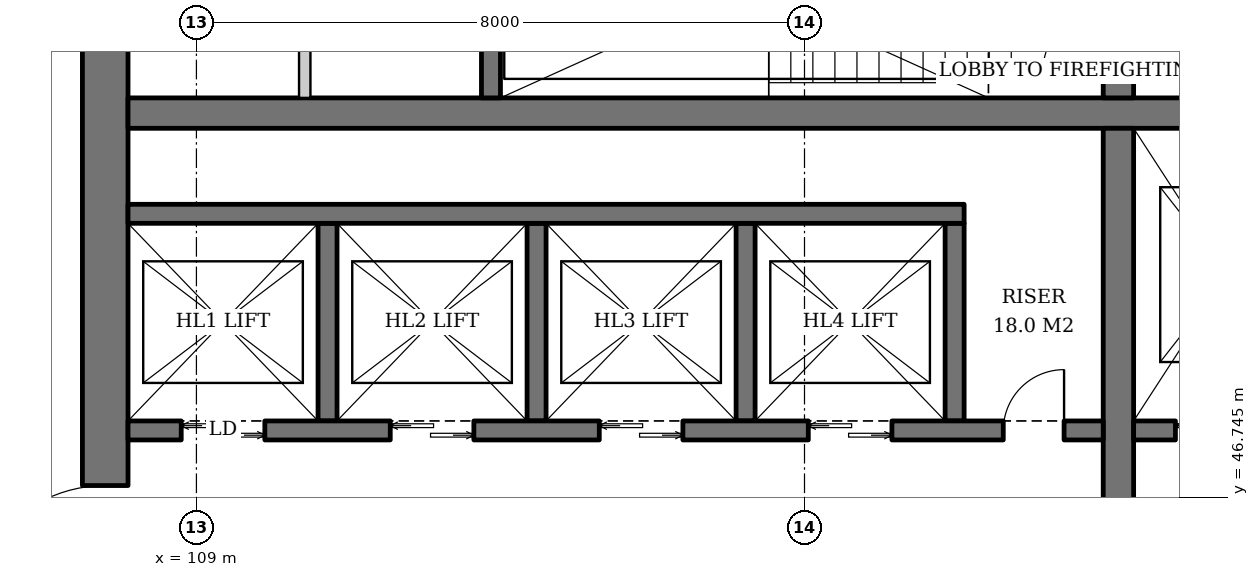
"""IFC4 building model, lengths in metres.
Left out: names, types, materials, properties, quantities, classifications, styles, units other than length and angle.
Written with IfcOpenShell. Run it as: python <this file> out.ifc"""

import sys

from ifc_helpers import new_model, si_unit, direction, frame, frame_2d, origin, place, context, subcontext, project, spatial, rectangle, extrude, element, fill, save


model = new_model("IFC4")
c1 = context("Model", 3, precision=1e-05, world=origin(), true_north=direction((0.0, 1.0)))
c2 = subcontext(c1, "Body", "Model", "MODEL_VIEW")
j1 = project(units=[si_unit("LENGTHUNIT", "METRE"), si_unit("PLANEANGLEUNIT", "RADIAN")], contexts=[c1])
p1 = place(None, origin())
s1 = spatial("IfcSite", under=j1, at=p1, CompositionType="ELEMENT")
p2 = place(p1, origin())
s2 = spatial("IfcBuilding", under=s1, at=p2, CompositionType="ELEMENT")
p3 = place(p2, frame((0.0, 0.0, 47.6)))
s3 = spatial("IfcBuildingStorey", under=s2, at=p3, CompositionType="ELEMENT", Elevation=47.6)
p4 = place(p3, frame((107.8, 37.1, 0.0), z_axis=(0.0, 0.0, 1.0), x_axis=(0.0, 1.0, 0.0)))
e1 = element("IfcWall", 1, at=p4, inside=s3, PredefinedType="SHEAR", context=c2, shape_type="SweptSolid", body=[
    extrude(rectangle(XDim=17.8, YDim=0.6, at=frame_2d((8.9, 0.0))), origin(), (0.0, 0.0, 1.0), 3.8),
])
p5 = place(p4, frame((8.0, 0.0, 0.0)))
e2 = element("IfcOpeningElement", 2, at=p5, cuts=e1, PredefinedType="OPENING", context=c2, shape_type="SweptSolid", body=[
    extrude(rectangle(XDim=1.8, YDim=2.4, at=frame_2d((0.9, 1.2))), frame((0.0, 0.31, 0.0), z_axis=(0.0, -1.0, 0.0), x_axis=(1.0, 0.0, 0.0)), (0.0, 0.0, 1.0), 0.62),
])
p6 = place(p3, frame((108.1, 51.8, 0.0), z_axis=(0.0, 0.0, 1.0), x_axis=(1.0, 0.0, 0.0)))
e3 = element("IfcWall", 3, at=p6, inside=s3, PredefinedType="SHEAR", context=c2, shape_type="SweptSolid", body=[
    extrude(rectangle(XDim=17.8, YDim=0.4, at=frame_2d((8.9, 0.0))), origin(), (0.0, 0.0, 1.0), 3.8),
])
p7 = place(p3, frame((121.13, 40.4, 0.0), z_axis=(0.0, 0.0, 1.0), x_axis=(0.0, 1.0, 0.0)))
e4 = element("IfcWall", 4, at=p7, inside=s3, PredefinedType="SHEAR", context=c2, shape_type="SweptSolid", body=[
    extrude(rectangle(XDim=11.2, YDim=0.4, at=frame_2d((5.6, 0.0))), origin(), (0.0, 0.0, 1.0), 3.8),
])
p8 = place(p3, frame((121.13, 52.0, 0.0), z_axis=(0.0, 0.0, 1.0), x_axis=(0.0, 1.0, 0.0)))
e5 = element("IfcWall", 5, at=p8, inside=s3, PredefinedType="SHEAR", context=c2, shape_type="SweptSolid", body=[
    extrude(rectangle(XDim=2.9, YDim=0.4, at=frame_2d((1.45, 0.0))), origin(), (0.0, 0.0, 1.0), 3.8),
])
p9 = place(p8, frame((0.3, 0.0, 0.0)))
e6 = element("IfcOpeningElement", 6, at=p9, cuts=e5, PredefinedType="OPENING", context=c2, shape_type="SweptSolid", body=[
    extrude(rectangle(XDim=1.0, YDim=2.1, at=frame_2d((0.5, 1.05))), frame((0.0, 0.21, 0.0), z_axis=(0.0, -1.0, 0.0), x_axis=(1.0, 0.0, 0.0)), (0.0, 0.0, 1.0), 0.42),
])
p10 = place(p3, frame((112.875, 52.0, 0.0), z_axis=(0.0, 0.0, 1.0), x_axis=(0.0, 1.0, 0.0)))
e7 = element("IfcWall", 7, at=p10, inside=s3, PredefinedType="SHEAR", context=c2, shape_type="SweptSolid", body=[
    extrude(rectangle(XDim=2.9, YDim=0.25, at=frame_2d((1.45, 0.0))), origin(), (0.0, 0.0, 1.0), 3.8),
])
for number, where, z_axis, x_axis in (
    (8, (110.725, 47.75, 0.0), (0.0, 0.0, 1.0), (0.0, 1.0, 0.0)),
    (9, (113.475, 47.75, 0.0), (0.0, 0.0, 1.0), (0.0, 1.0, 0.0)),
    (10, (116.225, 47.75, 0.0), (0.0, 0.0, 1.0), (0.0, 1.0, 0.0)),
    (11, (118.975, 47.75, 0.0), (0.0, 0.0, 1.0), (0.0, 1.0, 0.0)),
):
    element("IfcWall", number, at=place(p3, frame(where, z_axis=z_axis, x_axis=x_axis)), inside=s3, PredefinedType="SHEAR", context=c2, shape_type="SweptSolid", body=[
        extrude(rectangle(XDim=2.6, YDim=0.25, at=frame_2d((1.3, 0.0))), origin(), (0.0, 0.0, 1.0), 3.8),
    ])
p11 = place(p3, frame((108.1, 50.475, 0.0), z_axis=(0.0, 0.0, 1.0), x_axis=(1.0, 0.0, 0.0)))
e12 = element("IfcWall", 12, at=p11, inside=s3, PredefinedType="SHEAR", context=c2, shape_type="SweptSolid", body=[
    extrude(rectangle(XDim=11.0, YDim=0.25, at=frame_2d((5.5, 0.0))), origin(), (0.0, 0.0, 1.0), 3.8),
])
p12 = place(p3, frame((108.1, 47.625, 0.0), z_axis=(0.0, 0.0, 1.0), x_axis=(1.0, 0.0, 0.0)))
e13 = element("IfcWall", 13, at=p12, inside=s3, PredefinedType="SHEAR", context=c2, shape_type="SweptSolid", body=[
    extrude(rectangle(XDim=12.83, YDim=0.25, at=frame_2d((6.415, 0.0))), origin(), (0.0, 0.0, 1.0), 3.8),
])
p13 = place(p12, frame((0.7, 0.0, 0.0)))
e14 = element("IfcOpeningElement", 14, at=p13, cuts=e13, PredefinedType="OPENING", context=c2, shape_type="SweptSolid", body=[
    extrude(rectangle(XDim=1.1, YDim=2.2, at=frame_2d((0.55, 1.1))), frame((0.0, 0.135, 0.0), z_axis=(0.0, -1.0, 0.0), x_axis=(1.0, 0.0, 0.0)), (0.0, 0.0, 1.0), 0.27),
])
p14 = place(p12, frame((3.45, 0.0, 0.0)))
e15 = element("IfcOpeningElement", 15, at=p14, cuts=e13, PredefinedType="OPENING", context=c2, shape_type="SweptSolid", body=[
    extrude(rectangle(XDim=1.1, YDim=2.2, at=frame_2d((0.55, 1.1))), frame((0.0, 0.135, 0.0), z_axis=(0.0, -1.0, 0.0), x_axis=(1.0, 0.0, 0.0)), (0.0, 0.0, 1.0), 0.27),
])
p15 = place(p12, frame((6.2, 0.0, 0.0)))
e16 = element("IfcOpeningElement", 16, at=p15, cuts=e13, PredefinedType="OPENING", context=c2, shape_type="SweptSolid", body=[
    extrude(rectangle(XDim=1.1, YDim=2.2, at=frame_2d((0.55, 1.1))), frame((0.0, 0.135, 0.0), z_axis=(0.0, -1.0, 0.0), x_axis=(1.0, 0.0, 0.0)), (0.0, 0.0, 1.0), 0.27),
])
p16 = place(p12, frame((8.95, 0.0, 0.0)))
e17 = element("IfcOpeningElement", 17, at=p16, cuts=e13, PredefinedType="OPENING", context=c2, shape_type="SweptSolid", body=[
    extrude(rectangle(XDim=1.1, YDim=2.2, at=frame_2d((0.55, 1.1))), frame((0.0, 0.135, 0.0), z_axis=(0.0, -1.0, 0.0), x_axis=(1.0, 0.0, 0.0)), (0.0, 0.0, 1.0), 0.27),
])
p17 = place(p12, frame((11.515, 0.0, 0.0)))
e18 = element("IfcOpeningElement", 18, at=p17, cuts=e13, PredefinedType="OPENING", context=c2, shape_type="SweptSolid", body=[
    extrude(rectangle(XDim=0.8, YDim=2.0, at=frame_2d((0.4, 1.0))), frame((0.0, 0.135, 0.0), z_axis=(0.0, -1.0, 0.0), x_axis=(1.0, 0.0, 0.0)), (0.0, 0.0, 1.0), 0.27),
])
p18 = place(p3, frame((121.33, 47.625, 0.0), z_axis=(0.0, 0.0, 1.0), x_axis=(1.0, 0.0, 0.0)))
e19 = element("IfcWall", 19, at=p18, inside=s3, PredefinedType="SHEAR", context=c2, shape_type="SweptSolid", body=[
    extrude(rectangle(XDim=4.57, YDim=0.25, at=frame_2d((2.285, 0.0))), origin(), (0.0, 0.0, 1.0), 3.8),
])
p19 = place(p18, frame((0.55, 0.0, 0.0)))
e20 = element("IfcOpeningElement", 20, at=p19, cuts=e19, PredefinedType="OPENING", context=c2, shape_type="SweptSolid", body=[
    extrude(rectangle(XDim=1.4, YDim=2.4, at=frame_2d((0.7, 1.2))), frame((0.0, 0.135, 0.0), z_axis=(0.0, -1.0, 0.0), x_axis=(1.0, 0.0, 0.0)), (0.0, 0.0, 1.0), 0.27),
])
p20 = place(p18, frame((3.26, 0.0, 0.0)))
e21 = element("IfcOpeningElement", 21, at=p20, cuts=e19, PredefinedType="OPENING", context=c2, shape_type="SweptSolid", body=[
    extrude(rectangle(XDim=0.8, YDim=2.0, at=frame_2d((0.4, 1.0))), frame((0.0, 0.135, 0.0), z_axis=(0.0, -1.0, 0.0), x_axis=(1.0, 0.0, 0.0)), (0.0, 0.0, 1.0), 0.27),
])
p21 = place(p3, frame((110.425, 52.0, 0.0), z_axis=(0.0, 0.0, 1.0), x_axis=(0.0, 1.0, 0.0)))
e22 = element("IfcWall", 22, at=p21, inside=s3, PredefinedType="SOLIDWALL", context=c2, shape_type="SweptSolid", body=[
    extrude(rectangle(XDim=2.9, YDim=0.15, at=frame_2d((1.45, 0.0))), origin(), (0.0, 0.0, 1.0), 3.6),
])
p22 = place(p13, origin())
e23 = element("IfcDoor", 23, at=p22, inside=s3, OperationType="DOUBLE_DOOR_SLIDING", PredefinedType="DOOR", context=c2, shape_type="SweptSolid", body=[
    extrude(rectangle(XDim=1.1, YDim=2.2, at=frame_2d((0.55, 1.1))), frame((0.0, 0.025, 0.0), z_axis=(0.0, -1.0, 0.0), x_axis=(1.0, 0.0, 0.0)), (0.0, 0.0, 1.0), 0.05),
])
fill(e14, e23)
p23 = place(p14, origin())
e24 = element("IfcDoor", 24, at=p23, inside=s3, OperationType="DOUBLE_DOOR_SLIDING", PredefinedType="DOOR", context=c2, shape_type="SweptSolid", body=[
    extrude(rectangle(XDim=1.1, YDim=2.2, at=frame_2d((0.55, 1.1))), frame((0.0, 0.025, 0.0), z_axis=(0.0, -1.0, 0.0), x_axis=(1.0, 0.0, 0.0)), (0.0, 0.0, 1.0), 0.05),
])
fill(e15, e24)
p24 = place(p15, origin())
e25 = element("IfcDoor", 25, at=p24, inside=s3, OperationType="DOUBLE_DOOR_SLIDING", PredefinedType="DOOR", context=c2, shape_type="SweptSolid", body=[
    extrude(rectangle(XDim=1.1, YDim=2.2, at=frame_2d((0.55, 1.1))), frame((0.0, 0.025, 0.0), z_axis=(0.0, -1.0, 0.0), x_axis=(1.0, 0.0, 0.0)), (0.0, 0.0, 1.0), 0.05),
])
fill(e16, e25)
p25 = place(p16, origin())
e26 = element("IfcDoor", 26, at=p25, inside=s3, OperationType="DOUBLE_DOOR_SLIDING", PredefinedType="DOOR", context=c2, shape_type="SweptSolid", body=[
    extrude(rectangle(XDim=1.1, YDim=2.2, at=frame_2d((0.55, 1.1))), frame((0.0, 0.025, 0.0), z_axis=(0.0, -1.0, 0.0), x_axis=(1.0, 0.0, 0.0)), (0.0, 0.0, 1.0), 0.05),
])
fill(e17, e26)
p26 = place(p17, origin())
e27 = element("IfcDoor", 27, at=p26, inside=s3, OperationType="SINGLE_SWING_RIGHT", PredefinedType="DOOR", context=c2, shape_type="SweptSolid", body=[
    extrude(rectangle(XDim=0.8, YDim=2.0, at=frame_2d((0.4, 1.0))), frame((0.0, 0.025, 0.0), z_axis=(0.0, -1.0, 0.0), x_axis=(1.0, 0.0, 0.0)), (0.0, 0.0, 1.0), 0.05),
])
fill(e18, e27)
p27 = place(p19, origin())
e28 = element("IfcDoor", 28, at=p27, inside=s3, OperationType="DOUBLE_DOOR_SLIDING", PredefinedType="DOOR", context=c2, shape_type="SweptSolid", body=[
    extrude(rectangle(XDim=1.4, YDim=2.4, at=frame_2d((0.7, 1.2))), frame((0.0, 0.025, 0.0), z_axis=(0.0, -1.0, 0.0), x_axis=(1.0, 0.0, 0.0)), (0.0, 0.0, 1.0), 0.05),
])
fill(e20, e28)
p28 = place(p9, origin())
e29 = element("IfcDoor", 29, at=p28, inside=s3, OperationType="SINGLE_SWING_LEFT", PredefinedType="DOOR", context=c2, shape_type="SweptSolid", body=[
    extrude(rectangle(XDim=1.0, YDim=2.1, at=frame_2d((0.5, 1.05))), frame((0.0, 0.025, 0.0), z_axis=(0.0, -1.0, 0.0), x_axis=(1.0, 0.0, 0.0)), (0.0, 0.0, 1.0), 0.05),
])
fill(e6, e29)
p29 = place(p5, origin())
e30 = element("IfcDoor", 30, at=p29, inside=s3, OperationType="DOUBLE_DOOR_SINGLE_SWING", PredefinedType="DOOR", context=c2, shape_type="SweptSolid", body=[
    extrude(rectangle(XDim=1.8, YDim=2.4, at=frame_2d((0.9, 1.2))), frame((0.0, 0.025, 0.0), z_axis=(0.0, -1.0, 0.0), x_axis=(1.0, 0.0, 0.0)), (0.0, 0.0, 1.0), 0.05),
])
fill(e2, e30)
save(model, sys.argv[1])
